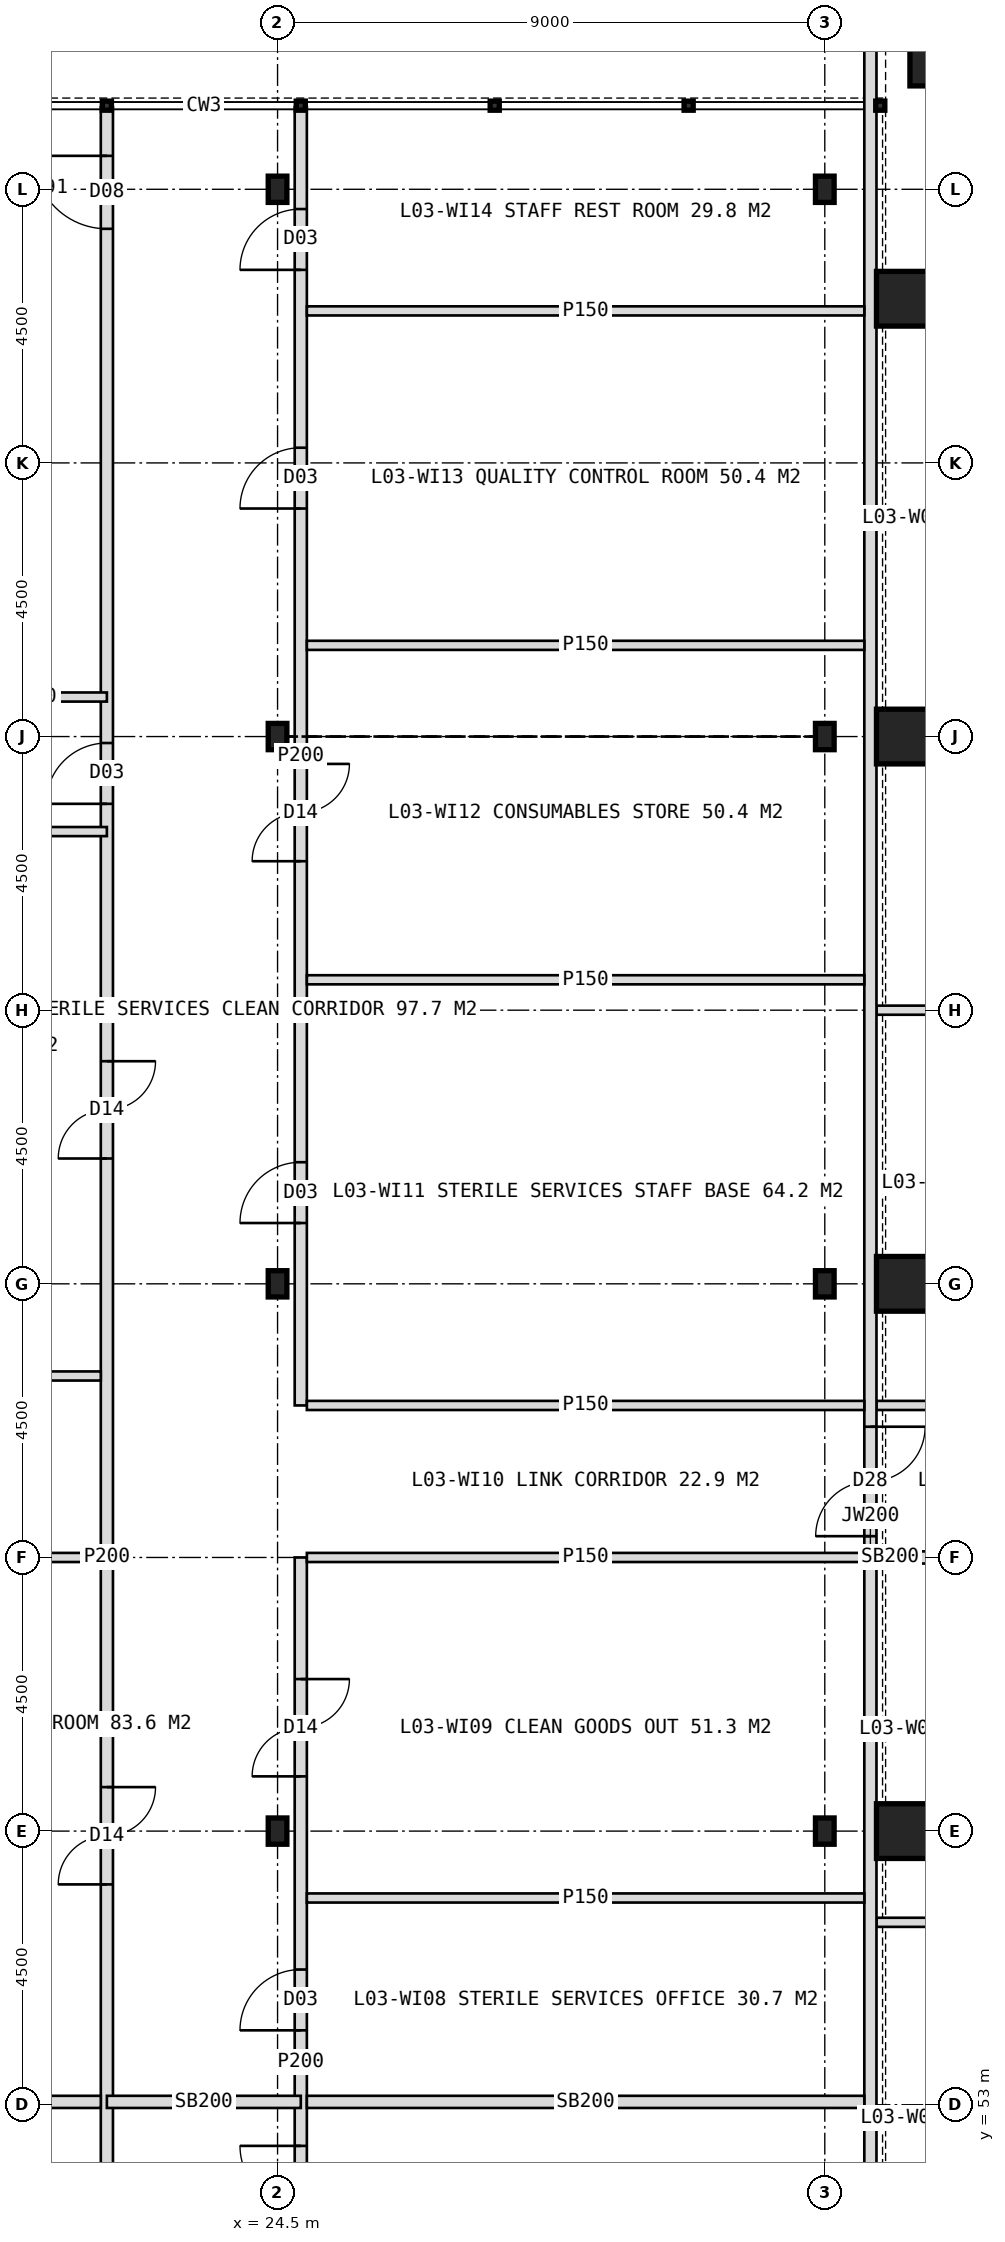
"""IFC4 building model, lengths in metres.
Left out: names, types, materials, properties, quantities, classifications, styles, units other than length and angle.
Written with IfcOpenShell. Run it as: python <this file> out.ifc"""

import sys

from ifc_helpers import new_model, si_unit, direction, frame, frame_2d, origin, origin_2d, place, context, subcontext, project, spatial, rectangle, hollow_rectangle, i_section, extrude, element, fill, save


model = new_model("IFC4")
c1 = context("Model", 3, precision=1e-05, world=origin(), true_north=direction((0.0, 1.0)))
c2 = subcontext(c1, "Body", "Model", "MODEL_VIEW")
j1 = project(units=[si_unit("LENGTHUNIT", "METRE"), si_unit("PLANEANGLEUNIT", "RADIAN")], contexts=[c1])
p1 = place(None, origin())
s1 = spatial("IfcSite", under=j1, at=p1, CompositionType="ELEMENT")
p2 = place(p1, origin())
s2 = spatial("IfcBuilding", under=s1, at=p2, CompositionType="ELEMENT")
p3 = place(p2, frame((0.0, 0.0, 16.5)))
s3 = spatial("IfcBuildingStorey", under=s2, at=p3, CompositionType="ELEMENT", Elevation=16.5)
for number, where, z_axis, x_axis in (
    (1, (34.8, 57.5, 0.0), (0.0, 0.0, 1.0), (1.0, 0.0, 0.0)),
    (2, (34.8, 66.5, 0.0), (0.0, 0.0, 1.0), (1.0, 0.0, 0.0)),
    (3, (34.8, 75.5, 0.0), (0.0, 0.0, 1.0), (1.0, 0.0, 0.0)),
    (4, (34.8, 82.7, 0.0), (0.0, 0.0, 1.0), (1.0, 0.0, 0.0)),
    (5, (35.35, 86.65, 0.0), (0.0, 0.0, 1.0), (1.0, 0.0, 0.0)),
):
    element("IfcColumn", number, at=place(p3, frame(where, z_axis=z_axis, x_axis=x_axis)), inside=s3, PredefinedType="COLUMN", context=c2, shape_type="SweptSolid", body=[
        extrude(hollow_rectangle(XDim=0.9, YDim=0.9, WallThickness=0.08, at=origin_2d()), origin(), (0.0, 0.0, 1.0), 4.5),
    ])
for number, where, z_axis, x_axis in (
    (6, (24.5, 57.5, 0.0), (0.0, 0.0, 1.0), (1.0, 0.0, 0.0)),
    (7, (24.5, 66.5, 0.0), (0.0, 0.0, 1.0), (1.0, 0.0, 0.0)),
    (8, (24.5, 75.5, 0.0), (0.0, 0.0, 1.0), (1.0, 0.0, 0.0)),
    (9, (24.5, 84.5, 0.0), (0.0, 0.0, 1.0), (1.0, 0.0, 0.0)),
    (10, (33.5, 57.5, 0.0), (0.0, 0.0, 1.0), (1.0, 0.0, 0.0)),
    (11, (33.5, 66.5, 0.0), (0.0, 0.0, 1.0), (1.0, 0.0, 0.0)),
    (12, (33.5, 75.5, 0.0), (0.0, 0.0, 1.0), (1.0, 0.0, 0.0)),
    (13, (33.5, 84.5, 0.0), (0.0, 0.0, 1.0), (1.0, 0.0, 0.0)),
):
    element("IfcColumn", number, at=place(p3, frame(where, z_axis=z_axis, x_axis=x_axis)), inside=s3, PredefinedType="COLUMN", context=c2, shape_type="SweptSolid", body=[
        extrude(i_section(OverallWidth=0.307, OverallDepth=0.432, WebThickness=0.021, FlangeThickness=0.04, FilletRadius=0.027, at=origin_2d()), origin(), (0.0, 0.0, 1.0), 4.5),
    ])
p4 = place(p3, frame((40.5, 56.0, 0.0), z_axis=(0.0, 0.0, 1.0), x_axis=(-1.0, 0.0, 0.0)))
e14 = element("IfcWall", 14, at=p4, inside=s3, PredefinedType="PARTITIONING", context=c2, shape_type="SweptSolid", body=[
    extrude(rectangle(XDim=6.15, YDim=0.15, at=frame_2d((3.075, 0.0))), origin(), (0.0, 0.0, 1.0), 4.2),
])
p5 = place(p3, frame((40.5, 62.0, 0.0), z_axis=(0.0, 0.0, 1.0), x_axis=(-1.0, 0.0, 0.0)))
e15 = element("IfcWall", 15, at=p5, inside=s3, PredefinedType="SOLIDWALL", context=c2, shape_type="SweptSolid", body=[
    extrude(rectangle(XDim=5.7, YDim=0.2, at=frame_2d((2.85, 0.0))), origin(), (0.0, 0.0, 1.0), 3.4),
])
p6 = place(p3, frame((34.8, 62.0, 0.0), z_axis=(0.0, 0.0, 1.0), x_axis=(-1.0, 0.0, 0.0)))
e16 = element("IfcWall", 16, at=p6, inside=s3, PredefinedType="SOLIDWALL", context=c2, shape_type="SweptSolid", body=[
    extrude(rectangle(XDim=0.45, YDim=0.2, at=frame_2d((0.225, 0.0))), origin(), (0.0, 0.0, 1.0), 4.2),
])
for number, where, z_axis, x_axis in (
    (17, (40.5, 64.5, 0.0), (0.0, 0.0, 1.0), (-1.0, 0.0, 0.0)),
    (18, (40.5, 71.0, 0.0), (0.0, 0.0, 1.0), (-1.0, 0.0, 0.0)),
):
    element("IfcWall", number, at=place(p3, frame(where, z_axis=z_axis, x_axis=x_axis)), inside=s3, PredefinedType="PARTITIONING", context=c2, shape_type="SweptSolid", body=[
        extrude(rectangle(XDim=6.15, YDim=0.15, at=frame_2d((3.075, 0.0))), origin(), (0.0, 0.0, 1.0), 4.2),
    ])
p7 = place(p3, frame((21.693, 38.15, 0.0), z_axis=(0.0, 0.0, 1.0), x_axis=(0.0, 1.0, 0.0)))
e19 = element("IfcWall", 19, at=p7, inside=s3, PredefinedType="PARTITIONING", context=c2, shape_type="SweptSolid", body=[
    extrude(rectangle(XDim=47.7, YDim=0.2, at=frame_2d((23.85, 0.0))), origin(), (0.0, 0.0, 1.0), 4.2),
])
p8 = place(p7, frame((45.7, 0.0, 0.0)))
e20 = element("IfcOpeningElement", 20, at=p8, cuts=e19, PredefinedType="OPENING", context=c2, shape_type="SweptSolid", body=[
    extrude(rectangle(XDim=1.2, YDim=2.1, at=frame_2d((0.6, 1.05))), frame((0.0, 0.11, 0.0), z_axis=(0.0, -1.0, 0.0), x_axis=(1.0, 0.0, 0.0)), (0.0, 0.0, 1.0), 0.22),
])
p9 = place(p7, frame((36.244, 0.0, 0.0)))
e21 = element("IfcOpeningElement", 21, at=p9, cuts=e19, PredefinedType="OPENING", context=c2, shape_type="SweptSolid", body=[
    extrude(rectangle(XDim=1.0, YDim=2.1, at=frame_2d((0.5, 1.05))), frame((0.0, 0.11, 0.0), z_axis=(0.0, -1.0, 0.0), x_axis=(1.0, 0.0, 0.0)), (0.0, 0.0, 1.0), 0.22),
])
p10 = place(p7, frame((2.122, 0.0, 0.0)))
e22 = element("IfcOpeningElement", 22, at=p10, cuts=e19, PredefinedType="OPENING", context=c2, shape_type="SweptSolid", body=[
    extrude(rectangle(XDim=1.6, YDim=2.2, at=frame_2d((0.8, 1.1))), frame((0.0, 0.11, 0.0), z_axis=(0.0, -1.0, 0.0), x_axis=(1.0, 0.0, 0.0)), (0.0, 0.0, 1.0), 0.22),
])
p11 = place(p7, frame((8.328, 0.0, 0.0)))
e23 = element("IfcOpeningElement", 23, at=p11, cuts=e19, PredefinedType="OPENING", context=c2, shape_type="SweptSolid", body=[
    extrude(rectangle(XDim=1.0, YDim=2.1, at=frame_2d((0.5, 1.05))), frame((0.0, 0.11, 0.0), z_axis=(0.0, -1.0, 0.0), x_axis=(1.0, 0.0, 0.0)), (0.0, 0.0, 1.0), 0.22),
])
p12 = place(p7, frame((18.473, 0.0, 0.0)))
e24 = element("IfcOpeningElement", 24, at=p12, cuts=e19, PredefinedType="OPENING", context=c2, shape_type="SweptSolid", body=[
    extrude(rectangle(XDim=1.6, YDim=2.2, at=frame_2d((0.8, 1.1))), frame((0.0, 0.11, 0.0), z_axis=(0.0, -1.0, 0.0), x_axis=(1.0, 0.0, 0.0)), (0.0, 0.0, 1.0), 0.22),
])
p13 = place(p7, frame((30.411, 0.0, 0.0)))
e25 = element("IfcOpeningElement", 25, at=p13, cuts=e19, PredefinedType="OPENING", context=c2, shape_type="SweptSolid", body=[
    extrude(rectangle(XDim=1.6, YDim=2.2, at=frame_2d((0.8, 1.1))), frame((0.0, 0.11, 0.0), z_axis=(0.0, -1.0, 0.0), x_axis=(1.0, 0.0, 0.0)), (0.0, 0.0, 1.0), 0.22),
])
p14 = place(p3, frame((24.882, 45.4, 0.0), z_axis=(0.0, 0.0, 1.0), x_axis=(0.0, 1.0, 0.0)))
e26 = element("IfcWall", 26, at=p14, inside=s3, PredefinedType="PARTITIONING", context=c2, shape_type="SweptSolid", body=[
    extrude(rectangle(XDim=16.6, YDim=0.2, at=frame_2d((8.3, 0.0))), origin(), (0.0, 0.0, 1.0), 4.2),
])
p15 = place(p14, frame((1.15, 0.0, 0.0)))
e27 = element("IfcOpeningElement", 27, at=p15, cuts=e26, PredefinedType="OPENING", context=c2, shape_type="SweptSolid", body=[
    extrude(rectangle(XDim=1.6, YDim=2.2, at=frame_2d((0.8, 1.1))), frame((0.0, 0.11, 0.0), z_axis=(0.0, -1.0, 0.0), x_axis=(1.0, 0.0, 0.0)), (0.0, 0.0, 1.0), 0.22),
])
p16 = place(p14, frame((5.924, 0.0, 0.0)))
e28 = element("IfcOpeningElement", 28, at=p16, cuts=e26, PredefinedType="OPENING", context=c2, shape_type="SweptSolid", body=[
    extrude(rectangle(XDim=1.0, YDim=2.1, at=frame_2d((0.5, 1.05))), frame((0.0, 0.11, 0.0), z_axis=(0.0, -1.0, 0.0), x_axis=(1.0, 0.0, 0.0)), (0.0, 0.0, 1.0), 0.22),
])
p17 = place(p14, frame((8.823, 0.0, 0.0)))
e29 = element("IfcOpeningElement", 29, at=p17, cuts=e26, PredefinedType="OPENING", context=c2, shape_type="SweptSolid", body=[
    extrude(rectangle(XDim=1.0, YDim=2.1, at=frame_2d((0.5, 1.05))), frame((0.0, 0.11, 0.0), z_axis=(0.0, -1.0, 0.0), x_axis=(1.0, 0.0, 0.0)), (0.0, 0.0, 1.0), 0.22),
])
p18 = place(p14, frame((13.0, 0.0, 0.0)))
e30 = element("IfcOpeningElement", 30, at=p18, cuts=e26, PredefinedType="OPENING", context=c2, shape_type="SweptSolid", body=[
    extrude(rectangle(XDim=1.6, YDim=2.2, at=frame_2d((0.8, 1.1))), frame((0.0, 0.11, 0.0), z_axis=(0.0, -1.0, 0.0), x_axis=(1.0, 0.0, 0.0)), (0.0, 0.0, 1.0), 0.22),
])
p19 = place(p3, frame((24.882, 64.5, 0.0), z_axis=(0.0, 0.0, 1.0), x_axis=(0.0, 1.0, 0.0)))
e31 = element("IfcWall", 31, at=p19, inside=s3, PredefinedType="PARTITIONING", context=c2, shape_type="SweptSolid", body=[
    extrude(rectangle(XDim=21.35, YDim=0.2, at=frame_2d((10.675, 0.0))), origin(), (0.0, 0.0, 1.0), 4.2),
])
p20 = place(p19, frame((3.0, 0.0, 0.0)))
e32 = element("IfcOpeningElement", 32, at=p20, cuts=e31, PredefinedType="OPENING", context=c2, shape_type="SweptSolid", body=[
    extrude(rectangle(XDim=1.0, YDim=2.1, at=frame_2d((0.5, 1.05))), frame((0.0, 0.11, 0.0), z_axis=(0.0, -1.0, 0.0), x_axis=(1.0, 0.0, 0.0)), (0.0, 0.0, 1.0), 0.22),
])
p21 = place(p19, frame((8.95, 0.0, 0.0)))
e33 = element("IfcOpeningElement", 33, at=p21, cuts=e31, PredefinedType="OPENING", context=c2, shape_type="SweptSolid", body=[
    extrude(rectangle(XDim=1.6, YDim=2.2, at=frame_2d((0.8, 1.1))), frame((0.0, 0.11, 0.0), z_axis=(0.0, -1.0, 0.0), x_axis=(1.0, 0.0, 0.0)), (0.0, 0.0, 1.0), 0.22),
])
p22 = place(p19, frame((14.75, 0.0, 0.0)))
e34 = element("IfcOpeningElement", 34, at=p22, cuts=e31, PredefinedType="OPENING", context=c2, shape_type="SweptSolid", body=[
    extrude(rectangle(XDim=1.0, YDim=2.1, at=frame_2d((0.5, 1.05))), frame((0.0, 0.11, 0.0), z_axis=(0.0, -1.0, 0.0), x_axis=(1.0, 0.0, 0.0)), (0.0, 0.0, 1.0), 0.22),
])
p23 = place(p19, frame((18.675, 0.0, 0.0)))
e35 = element("IfcOpeningElement", 35, at=p23, cuts=e31, PredefinedType="OPENING", context=c2, shape_type="SweptSolid", body=[
    extrude(rectangle(XDim=1.0, YDim=2.1, at=frame_2d((0.5, 1.05))), frame((0.0, 0.11, 0.0), z_axis=(0.0, -1.0, 0.0), x_axis=(1.0, 0.0, 0.0)), (0.0, 0.0, 1.0), 0.22),
])
p24 = place(p3, frame((21.693, 53.047, 0.0), z_axis=(0.0, 0.0, 1.0), x_axis=(1.0, 0.0, 0.0)))
e36 = element("IfcWall", 36, at=p24, inside=s3, PredefinedType="SOLIDWALL", context=c2, shape_type="SweptSolid", body=[
    extrude(rectangle(XDim=3.189, YDim=0.2, at=frame_2d((1.594, 0.0))), origin(), (0.0, 0.0, 1.0), 4.2),
])
p25 = place(p3, frame((34.25, 36.8, 0.0), z_axis=(0.0, 0.0, 1.0), x_axis=(0.0, 1.0, 0.0)))
e37 = element("IfcWall", 37, at=p25, inside=s3, PredefinedType="SOLIDWALL", context=c2, shape_type="SweptSolid", body=[
    extrude(rectangle(XDim=50.4, YDim=0.2, at=frame_2d((25.2, 0.0))), origin(), (0.0, 0.0, 1.0), 4.2),
])
p26 = place(p25, frame((6.25, 0.0, 0.0)))
e38 = element("IfcOpeningElement", 38, at=p26, cuts=e37, PredefinedType="OPENING", context=c2, shape_type="SweptSolid", body=[
    extrude(rectangle(XDim=1.8, YDim=2.2, at=frame_2d((0.9, 1.1))), frame((0.0, 0.11, 0.0), z_axis=(0.0, -1.0, 0.0), x_axis=(1.0, 0.0, 0.0)), (0.0, 0.0, 1.0), 0.22),
])
p27 = place(p25, frame((25.55, 0.0, 0.0)))
e39 = element("IfcOpeningElement", 39, at=p27, cuts=e37, PredefinedType="OPENING", context=c2, shape_type="SweptSolid", body=[
    extrude(rectangle(XDim=1.8, YDim=2.2, at=frame_2d((0.9, 1.1))), frame((0.0, 0.11, 0.0), z_axis=(0.0, -1.0, 0.0), x_axis=(1.0, 0.0, 0.0)), (0.0, 0.0, 1.0), 0.22),
])
p28 = place(p3, frame((19.3, 76.15, 0.0), z_axis=(0.0, 0.0, 1.0), x_axis=(1.0, 0.0, 0.0)))
e40 = element("IfcWall", 40, at=p28, inside=s3, PredefinedType="PARTITIONING", context=c2, shape_type="SweptSolid", body=[
    extrude(rectangle(XDim=2.393, YDim=0.15, at=frame_2d((1.197, 0.0))), origin(), (0.0, 0.0, 1.0), 4.2),
])
p29 = place(p3, frame((12.15, 73.938, 0.0), z_axis=(0.0, 0.0, 1.0), x_axis=(1.0, 0.0, 0.0)))
e41 = element("IfcWall", 41, at=p29, inside=s3, PredefinedType="PARTITIONING", context=c2, shape_type="SweptSolid", body=[
    extrude(rectangle(XDim=9.543, YDim=0.15, at=frame_2d((4.771, 0.0))), origin(), (0.0, 0.0, 1.0), 4.2),
])
p30 = place(p3, frame((12.15, 53.047, 0.0), z_axis=(0.0, 0.0, 1.0), x_axis=(1.0, 0.0, 0.0)))
e42 = element("IfcWall", 42, at=p30, inside=s3, PredefinedType="SOLIDWALL", context=c2, shape_type="SweptSolid", body=[
    extrude(rectangle(XDim=9.443, YDim=0.2, at=frame_2d((4.722, 0.0))), origin(), (0.0, 0.0, 1.0), 4.2),
])
p31 = place(p3, frame((12.15, 62.0, 0.0), z_axis=(0.0, 0.0, 1.0), x_axis=(1.0, 0.0, 0.0)))
e43 = element("IfcWall", 43, at=p31, inside=s3, PredefinedType="PARTITIONING", context=c2, shape_type="SweptSolid", body=[
    extrude(rectangle(XDim=9.443, YDim=0.15, at=frame_2d((4.722, 0.0))), origin(), (0.0, 0.0, 1.0), 4.2),
])
p32 = place(p31, frame((4.271, 0.0, 0.0)))
e44 = element("IfcOpeningElement", 44, at=p32, cuts=e43, PredefinedType="OPENING", context=c2, shape_type="SweptSolid", body=[
    extrude(rectangle(XDim=1.0, YDim=2.1, at=frame_2d((0.5, 1.05))), frame((0.0, 0.085, 0.0), z_axis=(0.0, -1.0, 0.0), x_axis=(1.0, 0.0, 0.0)), (0.0, 0.0, 1.0), 0.17),
])
p33 = place(p3, frame((12.15, 64.984, 0.0), z_axis=(0.0, 0.0, 1.0), x_axis=(1.0, 0.0, 0.0)))
e45 = element("IfcWall", 45, at=p33, inside=s3, PredefinedType="PARTITIONING", context=c2, shape_type="SweptSolid", body=[
    extrude(rectangle(XDim=9.443, YDim=0.15, at=frame_2d((4.722, 0.0))), origin(), (0.0, 0.0, 1.0), 4.2),
])
p34 = place(p33, frame((4.271, 0.0, 0.0)))
e46 = element("IfcOpeningElement", 46, at=p34, cuts=e45, PredefinedType="OPENING", context=c2, shape_type="SweptSolid", body=[
    extrude(rectangle(XDim=1.0, YDim=2.1, at=frame_2d((0.5, 1.05))), frame((0.0, 0.085, 0.0), z_axis=(0.0, -1.0, 0.0), x_axis=(1.0, 0.0, 0.0)), (0.0, 0.0, 1.0), 0.17),
])
p35 = place(p3, frame((24.982, 53.047, 0.0), z_axis=(0.0, 0.0, 1.0), x_axis=(1.0, 0.0, 0.0)))
e47 = element("IfcWall", 47, at=p35, inside=s3, PredefinedType="SOLIDWALL", context=c2, shape_type="SweptSolid", body=[
    extrude(rectangle(XDim=9.168, YDim=0.2, at=frame_2d((4.584, 0.0))), origin(), (0.0, 0.0, 1.0), 4.2),
])
for number, where, z_axis, x_axis in (
    (48, (24.982, 56.4, 0.0), (0.0, 0.0, 1.0), (1.0, 0.0, 0.0)),
    (49, (24.982, 62.0, 0.0), (0.0, 0.0, 1.0), (1.0, 0.0, 0.0)),
    (50, (24.982, 64.5, 0.0), (0.0, 0.0, 1.0), (1.0, 0.0, 0.0)),
    (51, (24.982, 71.5, 0.0), (0.0, 0.0, 1.0), (1.0, 0.0, 0.0)),
    (52, (24.982, 77.0, 0.0), (0.0, 0.0, 1.0), (1.0, 0.0, 0.0)),
    (53, (24.982, 82.5, 0.0), (0.0, 0.0, 1.0), (1.0, 0.0, 0.0)),
):
    element("IfcWall", number, at=place(p3, frame(where, z_axis=z_axis, x_axis=x_axis)), inside=s3, PredefinedType="PARTITIONING", context=c2, shape_type="SweptSolid", body=[
        extrude(rectangle(XDim=9.168, YDim=0.15, at=frame_2d((4.584, 0.0))), origin(), (0.0, 0.0, 1.0), 4.2),
    ])
p36 = place(p27, origin())
e54 = element("IfcDoor", 54, at=p36, inside=s3, OperationType="DOUBLE_DOOR_SINGLE_SWING", PredefinedType="DOOR", context=c2, shape_type="SweptSolid", body=[
    extrude(rectangle(XDim=1.8, YDim=2.2, at=frame_2d((0.9, 1.1))), frame((0.0, 0.025, 0.0), z_axis=(0.0, -1.0, 0.0), x_axis=(1.0, 0.0, 0.0)), (0.0, 0.0, 1.0), 0.05),
])
fill(e39, e54)
p37 = place(p8, origin())
e55 = element("IfcDoor", 55, at=p37, inside=s3, OperationType="SINGLE_SWING_RIGHT", PredefinedType="DOOR", context=c2, shape_type="SweptSolid", body=[
    extrude(rectangle(XDim=1.2, YDim=2.1, at=frame_2d((0.6, 1.05))), frame((0.0, 0.025, 0.0), z_axis=(0.0, -1.0, 0.0), x_axis=(1.0, 0.0, 0.0)), (0.0, 0.0, 1.0), 0.05),
])
fill(e20, e55)
p38 = place(p9, origin())
e56 = element("IfcDoor", 56, at=p38, inside=s3, OperationType="SINGLE_SWING_LEFT", PredefinedType="DOOR", context=c2, shape_type="SweptSolid", body=[
    extrude(rectangle(XDim=1.0, YDim=2.1, at=frame_2d((0.5, 1.05))), frame((0.0, 0.025, 0.0), z_axis=(0.0, -1.0, 0.0), x_axis=(1.0, 0.0, 0.0)), (0.0, 0.0, 1.0), 0.05),
])
fill(e21, e56)
p39 = place(p12, origin())
e57 = element("IfcDoor", 57, at=p39, inside=s3, OperationType="DOUBLE_DOOR_DOUBLE_SWING", PredefinedType="DOOR", context=c2, shape_type="SweptSolid", body=[
    extrude(rectangle(XDim=1.6, YDim=2.2, at=frame_2d((0.8, 1.1))), frame((0.0, 0.025, 0.0), z_axis=(0.0, -1.0, 0.0), x_axis=(1.0, 0.0, 0.0)), (0.0, 0.0, 1.0), 0.05),
])
fill(e24, e57)
p40 = place(p13, origin())
e58 = element("IfcDoor", 58, at=p40, inside=s3, OperationType="DOUBLE_DOOR_DOUBLE_SWING", PredefinedType="DOOR", context=c2, shape_type="SweptSolid", body=[
    extrude(rectangle(XDim=1.6, YDim=2.2, at=frame_2d((0.8, 1.1))), frame((0.0, 0.025, 0.0), z_axis=(0.0, -1.0, 0.0), x_axis=(1.0, 0.0, 0.0)), (0.0, 0.0, 1.0), 0.05),
])
fill(e25, e58)
p41 = place(p16, origin())
e59 = element("IfcDoor", 59, at=p41, inside=s3, OperationType="SINGLE_SWING_RIGHT", PredefinedType="DOOR", context=c2, shape_type="SweptSolid", body=[
    extrude(rectangle(XDim=1.0, YDim=2.1, at=frame_2d((0.5, 1.05))), frame((0.0, 0.025, 0.0), z_axis=(0.0, -1.0, 0.0), x_axis=(1.0, 0.0, 0.0)), (0.0, 0.0, 1.0), 0.05),
])
fill(e28, e59)
p42 = place(p17, origin())
e60 = element("IfcDoor", 60, at=p42, inside=s3, OperationType="SINGLE_SWING_LEFT", PredefinedType="DOOR", context=c2, shape_type="SweptSolid", body=[
    extrude(rectangle(XDim=1.0, YDim=2.1, at=frame_2d((0.5, 1.05))), frame((0.0, 0.025, 0.0), z_axis=(0.0, -1.0, 0.0), x_axis=(1.0, 0.0, 0.0)), (0.0, 0.0, 1.0), 0.05),
])
fill(e29, e60)
p43 = place(p18, origin())
e61 = element("IfcDoor", 61, at=p43, inside=s3, OperationType="DOUBLE_DOOR_DOUBLE_SWING", PredefinedType="DOOR", context=c2, shape_type="SweptSolid", body=[
    extrude(rectangle(XDim=1.6, YDim=2.2, at=frame_2d((0.8, 1.1))), frame((0.0, 0.025, 0.0), z_axis=(0.0, -1.0, 0.0), x_axis=(1.0, 0.0, 0.0)), (0.0, 0.0, 1.0), 0.05),
])
fill(e30, e61)
p44 = place(p20, origin())
e62 = element("IfcDoor", 62, at=p44, inside=s3, OperationType="SINGLE_SWING_LEFT", PredefinedType="DOOR", context=c2, shape_type="SweptSolid", body=[
    extrude(rectangle(XDim=1.0, YDim=2.1, at=frame_2d((0.5, 1.05))), frame((0.0, 0.025, 0.0), z_axis=(0.0, -1.0, 0.0), x_axis=(1.0, 0.0, 0.0)), (0.0, 0.0, 1.0), 0.05),
])
fill(e32, e62)
p45 = place(p21, origin())
e63 = element("IfcDoor", 63, at=p45, inside=s3, OperationType="DOUBLE_DOOR_DOUBLE_SWING", PredefinedType="DOOR", context=c2, shape_type="SweptSolid", body=[
    extrude(rectangle(XDim=1.6, YDim=2.2, at=frame_2d((0.8, 1.1))), frame((0.0, 0.025, 0.0), z_axis=(0.0, -1.0, 0.0), x_axis=(1.0, 0.0, 0.0)), (0.0, 0.0, 1.0), 0.05),
])
fill(e33, e63)
p46 = place(p22, origin())
e64 = element("IfcDoor", 64, at=p46, inside=s3, OperationType="SINGLE_SWING_LEFT", PredefinedType="DOOR", context=c2, shape_type="SweptSolid", body=[
    extrude(rectangle(XDim=1.0, YDim=2.1, at=frame_2d((0.5, 1.05))), frame((0.0, 0.025, 0.0), z_axis=(0.0, -1.0, 0.0), x_axis=(1.0, 0.0, 0.0)), (0.0, 0.0, 1.0), 0.05),
])
fill(e34, e64)
p47 = place(p23, origin())
e65 = element("IfcDoor", 65, at=p47, inside=s3, OperationType="SINGLE_SWING_LEFT", PredefinedType="DOOR", context=c2, shape_type="SweptSolid", body=[
    extrude(rectangle(XDim=1.0, YDim=2.1, at=frame_2d((0.5, 1.05))), frame((0.0, 0.025, 0.0), z_axis=(0.0, -1.0, 0.0), x_axis=(1.0, 0.0, 0.0)), (0.0, 0.0, 1.0), 0.05),
])
fill(e35, e65)
save(model, sys.argv[1])
